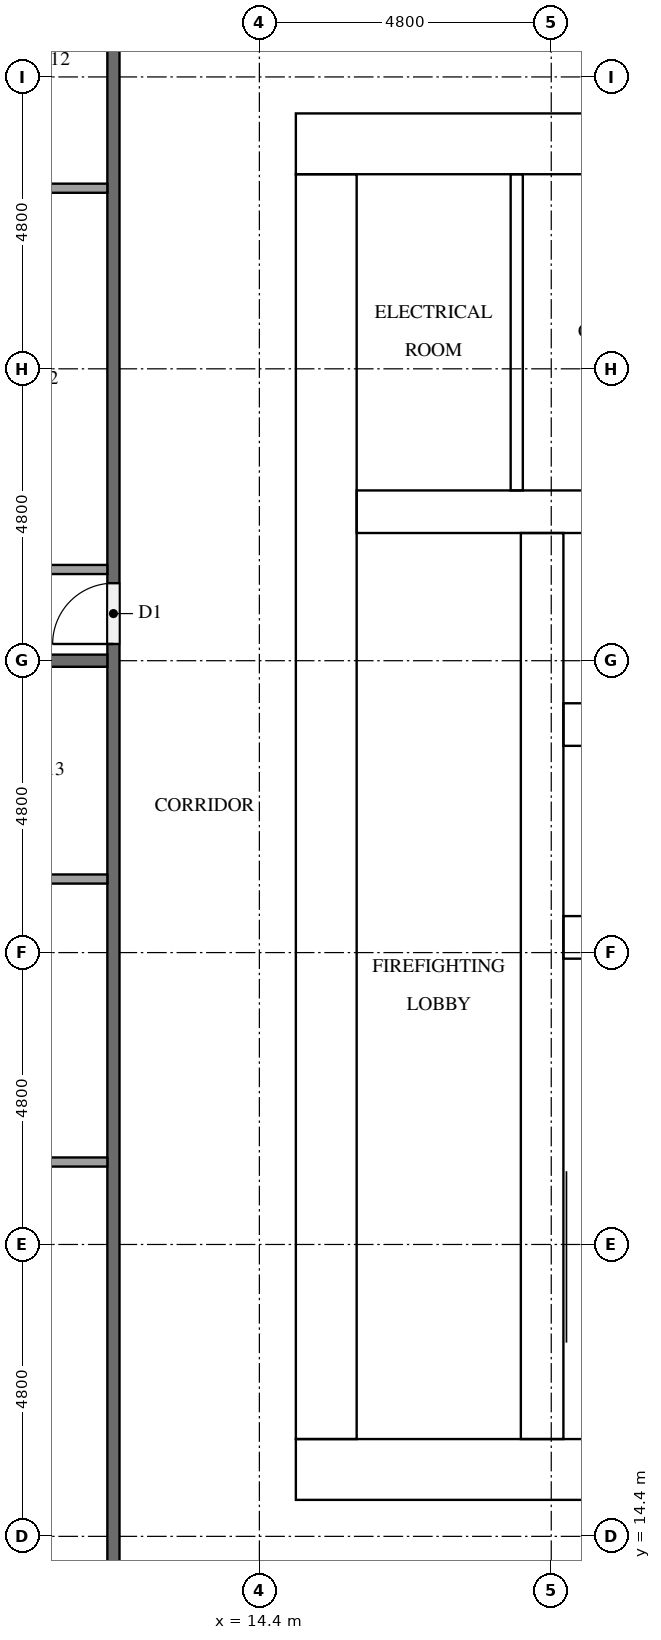
"""IFC4 building model, lengths in metres.
Left out: names, types, materials, properties, quantities, classifications, styles, units other than length and angle.
Written with IfcOpenShell. Run it as: python <this file> out.ifc"""

import sys

from ifc_helpers import new_model, si_unit, direction, frame, frame_2d, origin, place, context, subcontext, project, spatial, rectangle, extrude, element, fill, save


model = new_model("IFC4")
c1 = context("Model", 3, precision=1e-05, world=origin(), true_north=direction((0.0, 1.0)))
c2 = subcontext(c1, "Body", "Model", "MODEL_VIEW")
j1 = project(units=[si_unit("LENGTHUNIT", "METRE"), si_unit("PLANEANGLEUNIT", "RADIAN")], contexts=[c1])
p1 = place(None, origin())
s1 = spatial("IfcSite", under=j1, at=p1, CompositionType="ELEMENT")
p2 = place(p1, origin())
s2 = spatial("IfcBuilding", under=s1, at=p2, CompositionType="ELEMENT")
p3 = place(p2, frame((0.0, 0.0, 29.4)))
s3 = spatial("IfcBuildingStorey", under=s2, at=p3, CompositionType="ELEMENT", Elevation=29.4)
p4 = place(p3, frame((15.0, 15.5, 0.0), z_axis=(0.0, 0.0, 1.0), x_axis=(1.0, 0.0, 0.0)))
e1 = element("IfcWall", 1, at=p4, inside=s3, PredefinedType="SHEAR", context=c2, shape_type="SweptSolid", body=[
    extrude(rectangle(XDim=32.4, YDim=1.0, at=frame_2d((16.2, 0.0))), origin(), (0.0, 0.0, 1.0), 3.2),
])
p5 = place(p4, frame((15.3, 0.0, 0.0)))
e2 = element("IfcOpeningElement", 2, at=p5, cuts=e1, PredefinedType="OPENING", context=c2, shape_type="SweptSolid", body=[
    extrude(rectangle(XDim=1.8, YDim=2.1, at=frame_2d((0.9, 1.05))), frame((0.0, 0.51, 0.0), z_axis=(0.0, -1.0, 0.0), x_axis=(1.0, 0.0, 0.0)), (0.0, 0.0, 1.0), 1.02),
])
p6 = place(p3, frame((15.0, 37.3, 0.0), z_axis=(0.0, 0.0, 1.0), x_axis=(1.0, 0.0, 0.0)))
e3 = element("IfcWall", 3, at=p6, inside=s3, PredefinedType="SHEAR", context=c2, shape_type="SweptSolid", body=[
    extrude(rectangle(XDim=32.4, YDim=1.0, at=frame_2d((16.2, 0.0))), origin(), (0.0, 0.0, 1.0), 3.2),
])
p7 = place(p6, frame((15.3, 0.0, 0.0)))
e4 = element("IfcOpeningElement", 4, at=p7, cuts=e3, PredefinedType="OPENING", context=c2, shape_type="SweptSolid", body=[
    extrude(rectangle(XDim=1.8, YDim=2.1, at=frame_2d((0.9, 1.05))), frame((0.0, 0.51, 0.0), z_axis=(0.0, -1.0, 0.0), x_axis=(1.0, 0.0, 0.0)), (0.0, 0.0, 1.0), 1.02),
])
p8 = place(p6, frame((1.766, 0.0, 0.0)))
e5 = element("IfcOpeningElement", 5, at=p8, cuts=e3, PredefinedType="OPENING", context=c2, shape_type="SweptSolid", body=[
    extrude(rectangle(XDim=1.0, YDim=2.1, at=frame_2d((0.5, 1.05))), frame((0.0, 0.51, 0.0), z_axis=(0.0, -1.0, 0.0), x_axis=(1.0, 0.0, 0.0)), (0.0, 0.0, 1.0), 1.02),
])
p9 = place(p6, frame((5.241, 0.0, 0.0)))
e6 = element("IfcOpeningElement", 6, at=p9, cuts=e3, PredefinedType="OPENING", context=c2, shape_type="SweptSolid", body=[
    extrude(rectangle(XDim=1.0, YDim=2.1, at=frame_2d((0.5, 1.05))), frame((0.0, 0.51, 0.0), z_axis=(0.0, -1.0, 0.0), x_axis=(1.0, 0.0, 0.0)), (0.0, 0.0, 1.0), 1.02),
])
p10 = place(p3, frame((15.5, 16.0, 0.0), z_axis=(0.0, 0.0, 1.0), x_axis=(0.0, 1.0, 0.0)))
e7 = element("IfcWall", 7, at=p10, inside=s3, PredefinedType="SHEAR", context=c2, shape_type="SweptSolid", body=[
    extrude(rectangle(XDim=20.8, YDim=1.0, at=frame_2d((10.4, 0.0))), origin(), (0.0, 0.0, 1.0), 3.2),
])
p11 = place(p10, frame((4.76, 0.0, 0.0)))
e8 = element("IfcOpeningElement", 8, at=p11, cuts=e7, PredefinedType="OPENING", context=c2, shape_type="SweptSolid", body=[
    extrude(rectangle(XDim=1.2, YDim=2.1, at=frame_2d((0.6, 1.05))), frame((0.0, 0.51, 0.0), z_axis=(0.0, -1.0, 0.0), x_axis=(1.0, 0.0, 0.0)), (0.0, 0.0, 1.0), 1.02),
])
p12 = place(p3, frame((19.05, 16.0, 0.0), z_axis=(0.0, 0.0, 1.0), x_axis=(0.0, 1.0, 0.0)))
e9 = element("IfcWall", 9, at=p12, inside=s3, PredefinedType="SHEAR", context=c2, shape_type="SweptSolid", body=[
    extrude(rectangle(XDim=14.9, YDim=0.7, at=frame_2d((7.45, 0.0))), origin(), (0.0, 0.0, 1.0), 3.2),
])
p13 = place(p12, frame((9.45, 0.0, 0.0)))
e10 = element("IfcOpeningElement", 10, at=p13, cuts=e9, PredefinedType="OPENING", context=c2, shape_type="SweptSolid", body=[
    extrude(rectangle(XDim=1.1, YDim=2.1, at=frame_2d((0.55, 1.05))), frame((0.0, 0.36, 0.0), z_axis=(0.0, -1.0, 0.0), x_axis=(1.0, 0.0, 0.0)), (0.0, 0.0, 1.0), 0.72),
])
p14 = place(p12, frame((12.95, 0.0, 0.0)))
e11 = element("IfcOpeningElement", 11, at=p14, cuts=e9, PredefinedType="OPENING", context=c2, shape_type="SweptSolid", body=[
    extrude(rectangle(XDim=1.1, YDim=2.1, at=frame_2d((0.55, 1.05))), frame((0.0, 0.36, 0.0), z_axis=(0.0, -1.0, 0.0), x_axis=(1.0, 0.0, 0.0)), (0.0, 0.0, 1.0), 0.72),
])
p15 = place(p12, frame((0.2, 0.0, 0.0)))
e12 = element("IfcOpeningElement", 12, at=p15, cuts=e9, PredefinedType="OPENING", context=c2, shape_type="SweptSolid", body=[
    extrude(rectangle(XDim=1.2, YDim=2.1, at=frame_2d((0.6, 1.05))), frame((0.0, 0.36, 0.0), z_axis=(0.0, -1.0, 0.0), x_axis=(1.0, 0.0, 0.0)), (0.0, 0.0, 1.0), 0.72),
])
for number, where, z_axis, x_axis in (
    (13, (19.4, 24.25, 0.0), (0.0, 0.0, 1.0), (1.0, 0.0, 0.0)),
    (14, (19.4, 27.75, 0.0), (0.0, 0.0, 1.0), (1.0, 0.0, 0.0)),
):
    element("IfcWall", number, at=place(p3, frame(where, z_axis=z_axis, x_axis=x_axis)), inside=s3, PredefinedType="SHEAR", context=c2, shape_type="SweptSolid", body=[
        extrude(rectangle(XDim=3.35, YDim=0.7, at=frame_2d((1.675, 0.0))), origin(), (0.0, 0.0, 1.0), 3.2),
    ])
p16 = place(p3, frame((16.0, 31.25, 0.0), z_axis=(0.0, 0.0, 1.0), x_axis=(1.0, 0.0, 0.0)))
e15 = element("IfcWall", 15, at=p16, inside=s3, PredefinedType="SHEAR", context=c2, shape_type="SweptSolid", body=[
    extrude(rectangle(XDim=6.75, YDim=0.7, at=frame_2d((3.375, 0.0))), origin(), (0.0, 0.0, 1.0), 3.2),
])
p17 = place(p3, frame((18.633, 31.6, 0.0), z_axis=(0.0, 0.0, 1.0), x_axis=(0.0, 1.0, 0.0)))
e16 = element("IfcWall", 16, at=p17, inside=s3, PredefinedType="PARTITIONING", context=c2, shape_type="SweptSolid", body=[
    extrude(rectangle(XDim=5.2, YDim=0.2, at=frame_2d((2.6, 0.0))), origin(), (0.0, 0.0, 1.0), 3.2),
])
p18 = place(p3, frame((12.0, 12.1, 0.0), z_axis=(0.0, 0.0, 1.0), x_axis=(0.0, 1.0, 0.0)))
e17 = element("IfcWall", 17, at=p18, inside=s3, PredefinedType="PARTITIONING", context=c2, shape_type="SweptSolid", body=[
    extrude(rectangle(XDim=28.6, YDim=0.2, at=frame_2d((14.3, 0.0))), origin(), (0.0, 0.0, 1.0), 3.2),
])
p19 = place(p18, frame((16.975, 0.0, 0.0)))
e18 = element("IfcOpeningElement", 18, at=p19, cuts=e17, PredefinedType="OPENING", context=c2, shape_type="SweptSolid", body=[
    extrude(rectangle(XDim=1.0, YDim=2.1, at=frame_2d((0.5, 1.05))), frame((0.0, 0.11, 0.0), z_axis=(0.0, -1.0, 0.0), x_axis=(1.0, 0.0, 0.0)), (0.0, 0.0, 1.0), 0.22),
])
p20 = place(p18, frame((0.175, 0.0, 0.0)))
e19 = element("IfcOpeningElement", 19, at=p20, cuts=e17, PredefinedType="OPENING", context=c2, shape_type="SweptSolid", body=[
    extrude(rectangle(XDim=1.0, YDim=2.1, at=frame_2d((0.5, 1.05))), frame((0.0, 0.11, 0.0), z_axis=(0.0, -1.0, 0.0), x_axis=(1.0, 0.0, 0.0)), (0.0, 0.0, 1.0), 0.22),
])
p21 = place(p3, frame((0.1, 28.8, 0.0), z_axis=(0.0, 0.0, 1.0), x_axis=(1.0, 0.0, 0.0)))
e20 = element("IfcWall", 20, at=p21, inside=s3, PredefinedType="PARTITIONING", context=c2, shape_type="SweptSolid", body=[
    extrude(rectangle(XDim=11.8, YDim=0.2, at=frame_2d((5.9, 0.0))), origin(), (0.0, 0.0, 1.0), 3.2),
])
p22 = place(p3, frame((11.9, 36.57, 0.0), z_axis=(0.0, 0.0, 1.0), x_axis=(-1.0, 0.0, 0.0)))
e21 = element("IfcWall", 21, at=p22, inside=s3, PredefinedType="PARTITIONING", context=c2, shape_type="SweptSolid", body=[
    extrude(rectangle(XDim=3.725, YDim=0.15, at=frame_2d((1.862, 0.0))), origin(), (0.0, 0.0, 1.0), 3.2),
])
p23 = place(p3, frame((11.9, 30.3, 0.0), z_axis=(0.0, 0.0, 1.0), x_axis=(-1.0, 0.0, 0.0)))
e22 = element("IfcWall", 22, at=p23, inside=s3, PredefinedType="PARTITIONING", context=c2, shape_type="SweptSolid", body=[
    extrude(rectangle(XDim=3.875, YDim=0.15, at=frame_2d((1.938, 0.0))), origin(), (0.0, 0.0, 1.0), 3.2),
])
for number, where, z_axis, x_axis in (
    (23, (11.9, 20.556, 0.0), (0.0, 0.0, 1.0), (-1.0, 0.0, 0.0)),
    (24, (11.9, 25.21, 0.0), (0.0, 0.0, 1.0), (-1.0, 0.0, 0.0)),
):
    element("IfcWall", number, at=place(p3, frame(where, z_axis=z_axis, x_axis=x_axis)), inside=s3, PredefinedType="PARTITIONING", context=c2, shape_type="SweptSolid", body=[
        extrude(rectangle(XDim=4.475, YDim=0.15, at=frame_2d((2.237, 0.0))), origin(), (0.0, 0.0, 1.0), 3.2),
    ])
p24 = place(p13, origin())
e25 = element("IfcDoor", 25, at=p24, inside=s3, OperationType="DOUBLE_DOOR_SLIDING", PredefinedType="DOOR", context=c2, shape_type="SweptSolid", body=[
    extrude(rectangle(XDim=1.1, YDim=2.1, at=frame_2d((0.55, 1.05))), frame((0.0, 0.025, 0.0), z_axis=(0.0, -1.0, 0.0), x_axis=(1.0, 0.0, 0.0)), (0.0, 0.0, 1.0), 0.05),
])
fill(e10, e25)
p25 = place(p14, origin())
e26 = element("IfcDoor", 26, at=p25, inside=s3, OperationType="DOUBLE_DOOR_SLIDING", PredefinedType="DOOR", context=c2, shape_type="SweptSolid", body=[
    extrude(rectangle(XDim=1.1, YDim=2.1, at=frame_2d((0.55, 1.05))), frame((0.0, 0.025, 0.0), z_axis=(0.0, -1.0, 0.0), x_axis=(1.0, 0.0, 0.0)), (0.0, 0.0, 1.0), 0.05),
])
fill(e11, e26)
p26 = place(p15, frame((1.2, 0.0, 0.0), z_axis=(0.0, 0.0, 1.0), x_axis=(-1.0, 0.0, 0.0)))
e27 = element("IfcDoor", 27, at=p26, inside=s3, OperationType="SINGLE_SWING_RIGHT", PredefinedType="DOOR", context=c2, shape_type="SweptSolid", body=[
    extrude(rectangle(XDim=1.2, YDim=2.1, at=frame_2d((0.6, 1.05))), frame((0.0, 0.025, 0.0), z_axis=(0.0, -1.0, 0.0), x_axis=(1.0, 0.0, 0.0)), (0.0, 0.0, 1.0), 0.05),
])
fill(e12, e27)
p27 = place(p11, frame((1.2, 0.0, 0.0), z_axis=(0.0, 0.0, 1.0), x_axis=(-1.0, 0.0, 0.0)))
e28 = element("IfcDoor", 28, at=p27, inside=s3, OperationType="SINGLE_SWING_LEFT", PredefinedType="DOOR", context=c2, shape_type="SweptSolid", body=[
    extrude(rectangle(XDim=1.2, YDim=2.1, at=frame_2d((0.6, 1.05))), frame((0.0, 0.025, 0.0), z_axis=(0.0, -1.0, 0.0), x_axis=(1.0, 0.0, 0.0)), (0.0, 0.0, 1.0), 0.05),
])
fill(e8, e28)
p28 = place(p8, origin())
e29 = element("IfcDoor", 29, at=p28, inside=s3, OperationType="SINGLE_SWING_LEFT", PredefinedType="DOOR", context=c2, shape_type="SweptSolid", body=[
    extrude(rectangle(XDim=1.0, YDim=2.1, at=frame_2d((0.5, 1.05))), frame((0.0, 0.025, 0.0), z_axis=(0.0, -1.0, 0.0), x_axis=(1.0, 0.0, 0.0)), (0.0, 0.0, 1.0), 0.05),
])
fill(e5, e29)
p29 = place(p19, origin())
e30 = element("IfcDoor", 30, at=p29, inside=s3, OperationType="SINGLE_SWING_LEFT", PredefinedType="DOOR", context=c2, shape_type="SweptSolid", body=[
    extrude(rectangle(XDim=1.0, YDim=2.1, at=frame_2d((0.5, 1.05))), frame((0.0, 0.025, 0.0), z_axis=(0.0, -1.0, 0.0), x_axis=(1.0, 0.0, 0.0)), (0.0, 0.0, 1.0), 0.05),
])
fill(e18, e30)
save(model, sys.argv[1])
